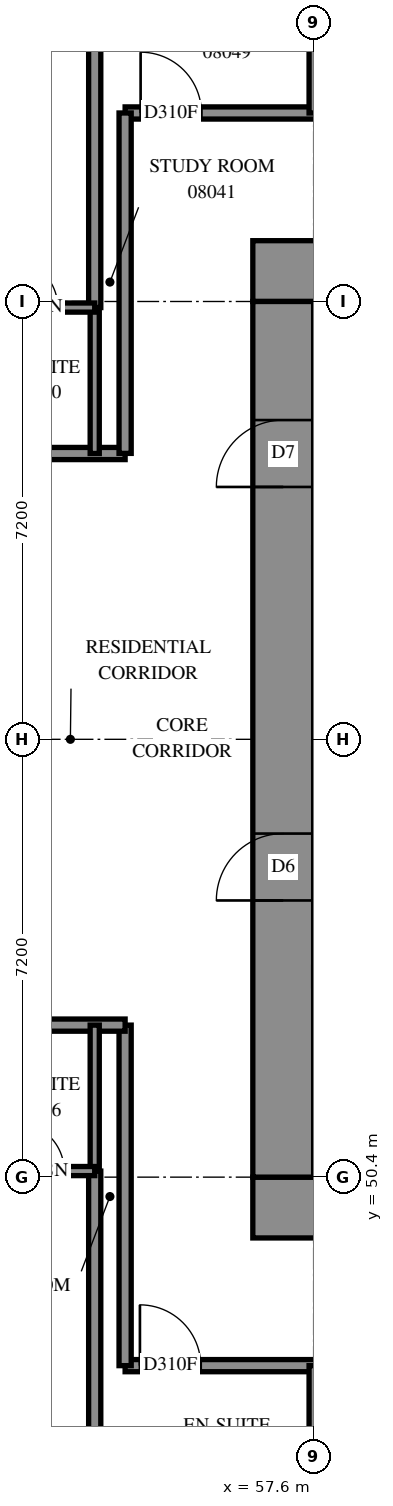
"""IFC4 building model, lengths in metres.
Left out: names, types, materials, properties, quantities, classifications, styles, units other than length and angle.
Written with IfcOpenShell. Run it as: python <this file> out.ifc"""

import sys

from ifc_helpers import new_model, si_unit, direction, frame, frame_2d, origin, place, context, subcontext, project, spatial, rectangle, extrude, element, fill, save


model = new_model("IFC4")
c1 = context("Model", 3, precision=1e-05, world=origin(), true_north=direction((0.0, 1.0)))
c2 = subcontext(c1, "Body", "Model", "MODEL_VIEW")
j1 = project(units=[si_unit("LENGTHUNIT", "METRE"), si_unit("PLANEANGLEUNIT", "RADIAN")], contexts=[c1])
p1 = place(None, origin())
s1 = spatial("IfcSite", under=j1, at=p1, CompositionType="ELEMENT")
p2 = place(p1, origin())
s2 = spatial("IfcBuilding", under=s1, at=p2, CompositionType="ELEMENT")
p3 = place(p2, frame((0.0, 0.0, 33.8)))
s3 = spatial("IfcBuildingStorey", under=s2, at=p3, CompositionType="ELEMENT", Elevation=33.8)
p4 = place(p3, frame((56.6, 49.9, -0.3), z_axis=(0.0, 0.0, 1.0), x_axis=(1.0, 0.0, 0.0)))
e1 = element("IfcWall", 1, at=p4, inside=s3, PredefinedType="SHEAR", context=c2, shape_type="SweptSolid", body=[
    extrude(rectangle(XDim=16.4, YDim=1.0, at=frame_2d((8.2, 0.0))), origin(), (0.0, 0.0, 1.0), 2.7),
])
p5 = place(p3, frame((56.6, 65.3, -0.3), z_axis=(0.0, 0.0, 1.0), x_axis=(1.0, 0.0, 0.0)))
e2 = element("IfcWall", 2, at=p5, inside=s3, PredefinedType="SHEAR", context=c2, shape_type="SweptSolid", body=[
    extrude(rectangle(XDim=16.4, YDim=1.0, at=frame_2d((8.2, 0.0))), origin(), (0.0, 0.0, 1.0), 2.7),
])
p6 = place(p5, frame((11.0, 0.0, 0.3)))
e3 = element("IfcOpeningElement", 3, at=p6, cuts=e2, PredefinedType="OPENING", context=c2, shape_type="SweptSolid", body=[
    extrude(rectangle(XDim=0.8, YDim=2.1, at=frame_2d((0.4, 1.05))), frame((0.0, 0.51, 0.0), z_axis=(0.0, -1.0, 0.0), x_axis=(1.0, 0.0, 0.0)), (0.0, 0.0, 1.0), 1.02),
])
p7 = place(p3, frame((57.1, 50.4, -0.3), z_axis=(0.0, 0.0, 1.0), x_axis=(0.0, 1.0, 0.0)))
e4 = element("IfcWall", 4, at=p7, inside=s3, PredefinedType="SHEAR", context=c2, shape_type="SweptSolid", body=[
    extrude(rectangle(XDim=14.4, YDim=1.0, at=frame_2d((7.2, 0.0))), origin(), (0.0, 0.0, 1.0), 2.7),
])
p8 = place(p7, frame((4.55, 0.0, 0.3)))
e5 = element("IfcOpeningElement", 5, at=p8, cuts=e4, PredefinedType="OPENING", context=c2, shape_type="SweptSolid", body=[
    extrude(rectangle(XDim=1.1, YDim=2.1, at=frame_2d((0.55, 1.05))), frame((0.0, 0.51, 0.0), z_axis=(0.0, -1.0, 0.0), x_axis=(1.0, 0.0, 0.0)), (0.0, 0.0, 1.0), 1.02),
])
p9 = place(p7, frame((11.35, 0.0, 0.3)))
e6 = element("IfcOpeningElement", 6, at=p9, cuts=e4, PredefinedType="OPENING", context=c2, shape_type="SweptSolid", body=[
    extrude(rectangle(XDim=1.1, YDim=2.1, at=frame_2d((0.55, 1.05))), frame((0.0, 0.51, 0.0), z_axis=(0.0, -1.0, 0.0), x_axis=(1.0, 0.0, 0.0)), (0.0, 0.0, 1.0), 1.02),
])
p10 = place(p3, frame((33.502, 62.3, 0.0), z_axis=(0.0, 0.0, 1.0), x_axis=(1.0, 0.0, 0.0)))
e7 = element("IfcWall", 7, at=p10, inside=s3, PredefinedType="PARTITIONING", context=c2, shape_type="SweptSolid", body=[
    extrude(rectangle(XDim=20.998, YDim=0.2, at=frame_2d((10.499, 0.0))), origin(), (0.0, 0.0, 1.0), 3.1),
])
p11 = place(p10, frame((2.898, 0.0, 0.0)))
e8 = element("IfcOpeningElement", 8, at=p11, cuts=e7, PredefinedType="OPENING", context=c2, shape_type="SweptSolid", body=[
    extrude(rectangle(XDim=0.9, YDim=2.1, at=frame_2d((0.45, 1.05))), frame((0.0, 0.11, 0.0), z_axis=(0.0, -1.0, 0.0), x_axis=(1.0, 0.0, 0.0)), (0.0, 0.0, 1.0), 0.22),
])
p12 = place(p10, frame((8.448, 0.0, 0.0)))
e9 = element("IfcOpeningElement", 9, at=p12, cuts=e7, PredefinedType="OPENING", context=c2, shape_type="SweptSolid", body=[
    extrude(rectangle(XDim=0.9, YDim=2.1, at=frame_2d((0.45, 1.05))), frame((0.0, 0.11, 0.0), z_axis=(0.0, -1.0, 0.0), x_axis=(1.0, 0.0, 0.0)), (0.0, 0.0, 1.0), 0.22),
])
p13 = place(p10, frame((10.098, 0.0, 0.0)))
e10 = element("IfcOpeningElement", 10, at=p13, cuts=e7, PredefinedType="OPENING", context=c2, shape_type="SweptSolid", body=[
    extrude(rectangle(XDim=0.9, YDim=2.1, at=frame_2d((0.45, 1.05))), frame((0.0, 0.11, 0.0), z_axis=(0.0, -1.0, 0.0), x_axis=(1.0, 0.0, 0.0)), (0.0, 0.0, 1.0), 0.22),
])
p14 = place(p10, frame((15.648, 0.0, 0.0)))
e11 = element("IfcOpeningElement", 11, at=p14, cuts=e7, PredefinedType="OPENING", context=c2, shape_type="SweptSolid", body=[
    extrude(rectangle(XDim=0.9, YDim=2.1, at=frame_2d((0.45, 1.05))), frame((0.0, 0.11, 0.0), z_axis=(0.0, -1.0, 0.0), x_axis=(1.0, 0.0, 0.0)), (0.0, 0.0, 1.0), 0.22),
])
p15 = place(p10, frame((17.298, 0.0, 0.0)))
e12 = element("IfcOpeningElement", 12, at=p15, cuts=e7, PredefinedType="OPENING", context=c2, shape_type="SweptSolid", body=[
    extrude(rectangle(XDim=0.9, YDim=2.1, at=frame_2d((0.45, 1.05))), frame((0.0, 0.11, 0.0), z_axis=(0.0, -1.0, 0.0), x_axis=(1.0, 0.0, 0.0)), (0.0, 0.0, 1.0), 0.22),
])
p16 = place(p3, frame((54.5, 67.9, 0.0), z_axis=(0.0, 0.0, 1.0), x_axis=(1.0, 0.0, 0.0)))
e13 = element("IfcWall", 13, at=p16, inside=s3, PredefinedType="PARTITIONING", context=c2, shape_type="SweptSolid", body=[
    extrude(rectangle(XDim=20.6, YDim=0.2, at=frame_2d((10.3, 0.0))), origin(), (0.0, 0.0, 1.0), 3.1),
])
p17 = place(p16, frame((0.255, 0.0, 0.0)))
e14 = element("IfcOpeningElement", 14, at=p17, cuts=e13, PredefinedType="OPENING", context=c2, shape_type="SweptSolid", body=[
    extrude(rectangle(XDim=1.0, YDim=2.1, at=frame_2d((0.5, 1.05))), frame((0.0, 0.11, 0.0), z_axis=(0.0, -1.0, 0.0), x_axis=(1.0, 0.0, 0.0)), (0.0, 0.0, 1.0), 0.22),
])
p18 = place(p16, frame((19.345, 0.0, 0.0)))
e15 = element("IfcOpeningElement", 15, at=p18, cuts=e13, PredefinedType="OPENING", context=c2, shape_type="SweptSolid", body=[
    extrude(rectangle(XDim=1.0, YDim=2.1, at=frame_2d((0.5, 1.05))), frame((0.0, 0.11, 0.0), z_axis=(0.0, -1.0, 0.0), x_axis=(1.0, 0.0, 0.0)), (0.0, 0.0, 1.0), 0.22),
])
p19 = place(p16, frame((5.45, 0.0, 0.0)))
e16 = element("IfcOpeningElement", 16, at=p19, cuts=e13, PredefinedType="OPENING", context=c2, shape_type="SweptSolid", body=[
    extrude(rectangle(XDim=0.9, YDim=2.1, at=frame_2d((0.45, 1.05))), frame((0.0, 0.11, 0.0), z_axis=(0.0, -1.0, 0.0), x_axis=(1.0, 0.0, 0.0)), (0.0, 0.0, 1.0), 0.22),
])
p20 = place(p16, frame((7.1, 0.0, 0.0)))
e17 = element("IfcOpeningElement", 17, at=p20, cuts=e13, PredefinedType="OPENING", context=c2, shape_type="SweptSolid", body=[
    extrude(rectangle(XDim=0.9, YDim=2.1, at=frame_2d((0.45, 1.05))), frame((0.0, 0.11, 0.0), z_axis=(0.0, -1.0, 0.0), x_axis=(1.0, 0.0, 0.0)), (0.0, 0.0, 1.0), 0.22),
])
p21 = place(p16, frame((12.65, 0.0, 0.0)))
e18 = element("IfcOpeningElement", 18, at=p21, cuts=e13, PredefinedType="OPENING", context=c2, shape_type="SweptSolid", body=[
    extrude(rectangle(XDim=0.9, YDim=2.1, at=frame_2d((0.45, 1.05))), frame((0.0, 0.11, 0.0), z_axis=(0.0, -1.0, 0.0), x_axis=(1.0, 0.0, 0.0)), (0.0, 0.0, 1.0), 0.22),
])
p22 = place(p16, frame((14.3, 0.0, 0.0)))
e19 = element("IfcOpeningElement", 19, at=p22, cuts=e13, PredefinedType="OPENING", context=c2, shape_type="SweptSolid", body=[
    extrude(rectangle(XDim=0.9, YDim=2.1, at=frame_2d((0.45, 1.05))), frame((0.0, 0.11, 0.0), z_axis=(0.0, -1.0, 0.0), x_axis=(1.0, 0.0, 0.0)), (0.0, 0.0, 1.0), 0.22),
])
p23 = place(p3, frame((54.5, 47.3, 0.0), z_axis=(0.0, 0.0, 1.0), x_axis=(1.0, 0.0, 0.0)))
e20 = element("IfcWall", 20, at=p23, inside=s3, PredefinedType="PARTITIONING", context=c2, shape_type="SweptSolid", body=[
    extrude(rectangle(XDim=19.56, YDim=0.2, at=frame_2d((9.78, 0.0))), origin(), (0.0, 0.0, 1.0), 3.1),
])
p24 = place(p23, frame((0.243, 0.0, 0.0)))
e21 = element("IfcOpeningElement", 21, at=p24, cuts=e20, PredefinedType="OPENING", context=c2, shape_type="SweptSolid", body=[
    extrude(rectangle(XDim=1.0, YDim=2.1, at=frame_2d((0.5, 1.05))), frame((0.0, 0.11, 0.0), z_axis=(0.0, -1.0, 0.0), x_axis=(1.0, 0.0, 0.0)), (0.0, 0.0, 1.0), 0.22),
])
p25 = place(p23, frame((5.4, 0.0, 0.0)))
e22 = element("IfcOpeningElement", 22, at=p25, cuts=e20, PredefinedType="OPENING", context=c2, shape_type="SweptSolid", body=[
    extrude(rectangle(XDim=0.9, YDim=2.1, at=frame_2d((0.45, 1.05))), frame((0.0, 0.11, 0.0), z_axis=(0.0, -1.0, 0.0), x_axis=(1.0, 0.0, 0.0)), (0.0, 0.0, 1.0), 0.22),
])
p26 = place(p23, frame((7.1, 0.0, 0.0)))
e23 = element("IfcOpeningElement", 23, at=p26, cuts=e20, PredefinedType="OPENING", context=c2, shape_type="SweptSolid", body=[
    extrude(rectangle(XDim=0.9, YDim=2.1, at=frame_2d((0.45, 1.05))), frame((0.0, 0.11, 0.0), z_axis=(0.0, -1.0, 0.0), x_axis=(1.0, 0.0, 0.0)), (0.0, 0.0, 1.0), 0.22),
])
p27 = place(p23, frame((12.6, 0.0, 0.0)))
e24 = element("IfcOpeningElement", 24, at=p27, cuts=e20, PredefinedType="OPENING", context=c2, shape_type="SweptSolid", body=[
    extrude(rectangle(XDim=0.9, YDim=2.1, at=frame_2d((0.45, 1.05))), frame((0.0, 0.11, 0.0), z_axis=(0.0, -1.0, 0.0), x_axis=(1.0, 0.0, 0.0)), (0.0, 0.0, 1.0), 0.22),
])
p28 = place(p23, frame((14.3, 0.0, 0.0)))
e25 = element("IfcOpeningElement", 25, at=p28, cuts=e20, PredefinedType="OPENING", context=c2, shape_type="SweptSolid", body=[
    extrude(rectangle(XDim=0.9, YDim=2.1, at=frame_2d((0.45, 1.05))), frame((0.0, 0.11, 0.0), z_axis=(0.0, -1.0, 0.0), x_axis=(1.0, 0.0, 0.0)), (0.0, 0.0, 1.0), 0.22),
])
p29 = place(p3, frame((54.0, 42.407, 0.0), z_axis=(0.0, 0.0, 1.0), x_axis=(0.0, 1.0, 0.0)))
e26 = element("IfcWall", 26, at=p29, inside=s3, PredefinedType="PARTITIONING", context=c2, shape_type="SweptSolid", body=[
    extrude(rectangle(XDim=8.093, YDim=0.2, at=frame_2d((4.046, 0.0))), origin(), (0.0, 0.0, 1.0), 3.1),
])
p30 = place(p3, frame((54.0, 64.7, 0.0), z_axis=(0.0, 0.0, 1.0), x_axis=(0.0, 1.0, 0.0)))
e27 = element("IfcWall", 27, at=p30, inside=s3, PredefinedType="PARTITIONING", context=c2, shape_type="SweptSolid", body=[
    extrude(rectangle(XDim=7.99, YDim=0.2, at=frame_2d((3.995, 0.0))), origin(), (0.0, 0.0, 1.0), 3.1),
])
p31 = place(p3, frame((54.5, 47.3, 0.0), z_axis=(0.0, 0.0, 1.0), x_axis=(0.0, 1.0, 0.0)))
e28 = element("IfcWall", 28, at=p31, inside=s3, PredefinedType="PARTITIONING", context=c2, shape_type="SweptSolid", body=[
    extrude(rectangle(XDim=5.6, YDim=0.2, at=frame_2d((2.8, 0.0))), origin(), (0.0, 0.0, 1.0), 3.1),
])
p32 = place(p3, frame((54.5, 62.302, 0.0), z_axis=(0.0, 0.0, 1.0), x_axis=(0.0, 1.0, 0.0)))
e29 = element("IfcWall", 29, at=p32, inside=s3, PredefinedType="PARTITIONING", context=c2, shape_type="SweptSolid", body=[
    extrude(rectangle(XDim=5.598, YDim=0.2, at=frame_2d((2.799, 0.0))), origin(), (0.0, 0.0, 1.0), 3.1),
])
p33 = place(p3, frame((50.4, 52.9, 0.0), z_axis=(0.0, 0.0, 1.0), x_axis=(1.0, 0.0, 0.0)))
e30 = element("IfcWall", 30, at=p33, inside=s3, PredefinedType="PARTITIONING", context=c2, shape_type="SweptSolid", body=[
    extrude(rectangle(XDim=4.1, YDim=0.2, at=frame_2d((2.05, 0.0))), origin(), (0.0, 0.0, 1.0), 3.1),
])
p34 = place(p33, frame((0.4, 0.0, 0.0)))
e31 = element("IfcOpeningElement", 31, at=p34, cuts=e30, PredefinedType="OPENING", context=c2, shape_type="SweptSolid", body=[
    extrude(rectangle(XDim=0.9, YDim=2.1, at=frame_2d((0.45, 1.05))), frame((0.0, 0.11, 0.0), z_axis=(0.0, -1.0, 0.0), x_axis=(1.0, 0.0, 0.0)), (0.0, 0.0, 1.0), 0.22),
])
for number, where, z_axis, x_axis in (
    (32, (54.0, 62.3, 0.0), (0.0, 0.0, 1.0), (0.0, 1.0, 0.0)),
    (33, (54.0, 50.5, 0.0), (0.0, 0.0, 1.0), (0.0, 1.0, 0.0)),
    (34, (57.6, 44.9, 0.0), (0.0, 0.0, 1.0), (0.0, 1.0, 0.0)),
    (35, (57.6, 67.9, 0.0), (0.0, 0.0, 1.0), (0.0, 1.0, 0.0)),
):
    element("IfcWall", number, at=place(p3, frame(where, z_axis=z_axis, x_axis=x_axis)), inside=s3, PredefinedType="PARTITIONING", context=c2, shape_type="SweptSolid", body=[
        extrude(rectangle(XDim=2.4, YDim=0.15, at=frame_2d((1.2, 0.0))), origin(), (0.0, 0.0, 1.0), 3.1),
    ])
p35 = place(p3, frame((52.1, 64.7, 0.0), z_axis=(0.0, 0.0, 1.0), x_axis=(1.0, 0.0, 0.0)))
e36 = element("IfcWall", 36, at=p35, inside=s3, PredefinedType="PARTITIONING", context=c2, shape_type="SweptSolid", body=[
    extrude(rectangle(XDim=1.9, YDim=0.15, at=frame_2d((0.95, 0.0))), origin(), (0.0, 0.0, 1.0), 3.1),
])
p36 = place(p35, frame((0.493, 0.0, 0.0)))
e37 = element("IfcOpeningElement", 37, at=p36, cuts=e36, PredefinedType="OPENING", context=c2, shape_type="SweptSolid", body=[
    extrude(rectangle(XDim=0.8, YDim=2.1, at=frame_2d((0.4, 1.05))), frame((0.0, 0.085, 0.0), z_axis=(0.0, -1.0, 0.0), x_axis=(1.0, 0.0, 0.0)), (0.0, 0.0, 1.0), 0.17),
])
p37 = place(p3, frame((52.1, 50.5, 0.0), z_axis=(0.0, 0.0, 1.0), x_axis=(1.0, 0.0, 0.0)))
e38 = element("IfcWall", 38, at=p37, inside=s3, PredefinedType="PARTITIONING", context=c2, shape_type="SweptSolid", body=[
    extrude(rectangle(XDim=1.9, YDim=0.15, at=frame_2d((0.95, 0.0))), origin(), (0.0, 0.0, 1.0), 3.1),
])
p38 = place(p37, frame((0.598, 0.0, 0.0)))
e39 = element("IfcOpeningElement", 39, at=p38, cuts=e38, PredefinedType="OPENING", context=c2, shape_type="SweptSolid", body=[
    extrude(rectangle(XDim=0.8, YDim=2.1, at=frame_2d((0.4, 1.05))), frame((0.0, 0.085, 0.0), z_axis=(0.0, -1.0, 0.0), x_axis=(1.0, 0.0, 0.0)), (0.0, 0.0, 1.0), 0.17),
])
p39 = place(p8, origin())
e40 = element("IfcDoor", 40, at=p39, inside=s3, OperationType="DOUBLE_DOOR_SINGLE_SWING", PredefinedType="DOOR", context=c2, shape_type="SweptSolid", body=[
    extrude(rectangle(XDim=1.1, YDim=2.1, at=frame_2d((0.55, 1.05))), frame((0.0, 0.025, 0.0), z_axis=(0.0, -1.0, 0.0), x_axis=(1.0, 0.0, 0.0)), (0.0, 0.0, 1.0), 0.05),
])
fill(e5, e40)
p40 = place(p9, origin())
e41 = element("IfcDoor", 41, at=p40, inside=s3, OperationType="SINGLE_SWING_LEFT", PredefinedType="DOOR", context=c2, shape_type="SweptSolid", body=[
    extrude(rectangle(XDim=1.1, YDim=2.1, at=frame_2d((0.55, 1.05))), frame((0.0, 0.025, 0.0), z_axis=(0.0, -1.0, 0.0), x_axis=(1.0, 0.0, 0.0)), (0.0, 0.0, 1.0), 0.05),
])
fill(e6, e41)
p41 = place(p36, origin())
e42 = element("IfcDoor", 42, at=p41, inside=s3, OperationType="SINGLE_SWING_RIGHT", PredefinedType="DOOR", context=c2, shape_type="SweptSolid", body=[
    extrude(rectangle(XDim=0.8, YDim=2.1, at=frame_2d((0.4, 1.05))), frame((0.0, 0.025, 0.0), z_axis=(0.0, -1.0, 0.0), x_axis=(1.0, 0.0, 0.0)), (0.0, 0.0, 1.0), 0.05),
])
fill(e37, e42)
p42 = place(p17, origin())
e43 = element("IfcDoor", 43, at=p42, inside=s3, OperationType="SINGLE_SWING_LEFT", PredefinedType="DOOR", context=c2, shape_type="SweptSolid", body=[
    extrude(rectangle(XDim=1.0, YDim=2.1, at=frame_2d((0.5, 1.05))), frame((0.0, 0.025, 0.0), z_axis=(0.0, -1.0, 0.0), x_axis=(1.0, 0.0, 0.0)), (0.0, 0.0, 1.0), 0.05),
])
fill(e14, e43)
p43 = place(p38, origin())
e44 = element("IfcDoor", 44, at=p43, inside=s3, OperationType="SINGLE_SWING_RIGHT", PredefinedType="DOOR", context=c2, shape_type="SweptSolid", body=[
    extrude(rectangle(XDim=0.8, YDim=2.1, at=frame_2d((0.4, 1.05))), frame((0.0, 0.025, 0.0), z_axis=(0.0, -1.0, 0.0), x_axis=(1.0, 0.0, 0.0)), (0.0, 0.0, 1.0), 0.05),
])
fill(e39, e44)
p44 = place(p24, origin())
e45 = element("IfcDoor", 45, at=p44, inside=s3, OperationType="SINGLE_SWING_RIGHT", PredefinedType="DOOR", context=c2, shape_type="SweptSolid", body=[
    extrude(rectangle(XDim=1.0, YDim=2.1, at=frame_2d((0.5, 1.05))), frame((0.0, 0.025, 0.0), z_axis=(0.0, -1.0, 0.0), x_axis=(1.0, 0.0, 0.0)), (0.0, 0.0, 1.0), 0.05),
])
fill(e21, e45)
save(model, sys.argv[1])
